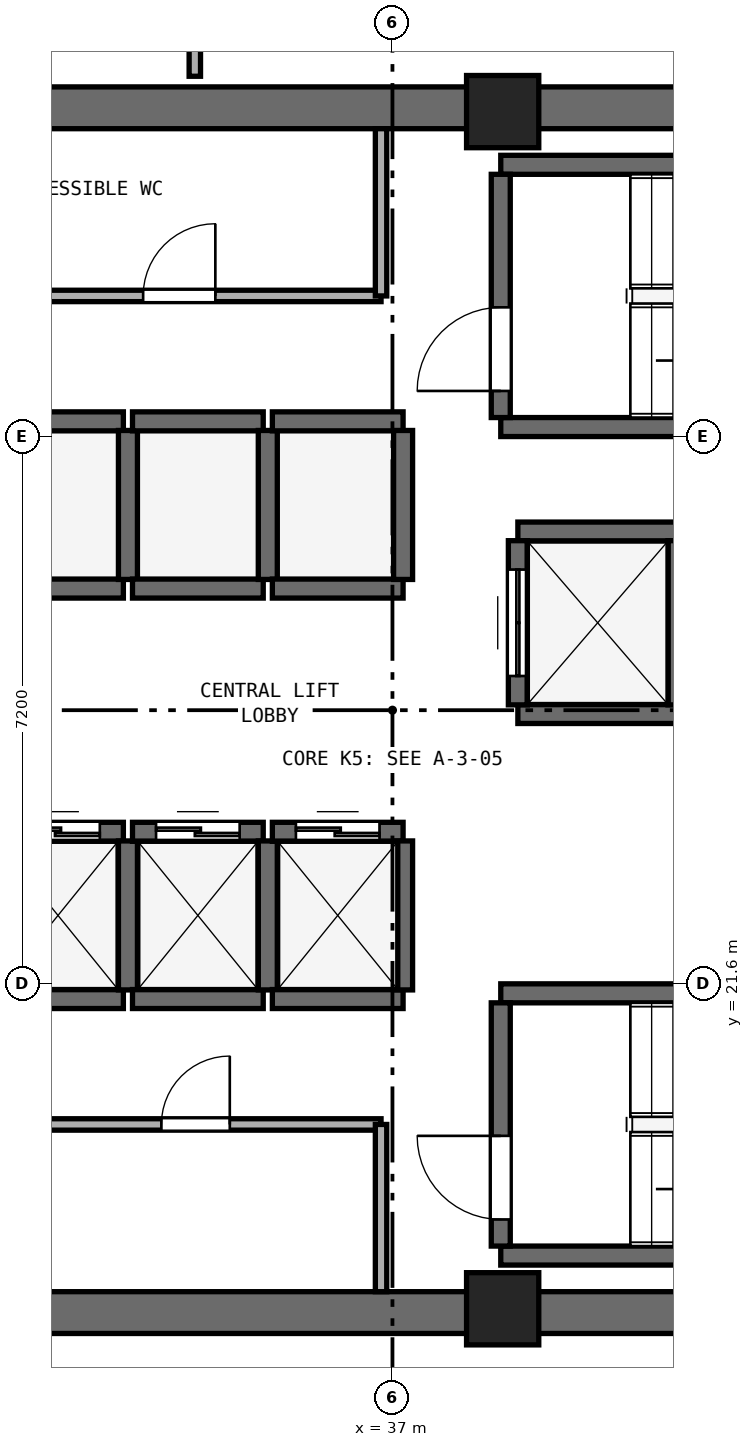
"""IFC4 building model, lengths in metres.
Left out: names, types, materials, properties, quantities, classifications, styles, units other than length and angle.
Written with IfcOpenShell. Run it as: python <this file> out.ifc"""

import sys

from ifc_helpers import new_model, si_unit, direction, frame, frame_2d, origin, origin_2d, place, context, subcontext, project, spatial, rectangle, extrude, element, fill, save


model = new_model("IFC4")
c1 = context("Model", 3, precision=1e-05, world=origin(), true_north=direction((0.0, 1.0)))
c2 = subcontext(c1, "Body", "Model", "MODEL_VIEW")
j1 = project(units=[si_unit("LENGTHUNIT", "METRE"), si_unit("PLANEANGLEUNIT", "RADIAN")], contexts=[c1])
p1 = place(None, origin())
s1 = spatial("IfcSite", under=j1, at=p1, CompositionType="ELEMENT")
p2 = place(p1, origin())
s2 = spatial("IfcBuilding", under=s1, at=p2, CompositionType="ELEMENT")
p3 = place(p2, frame((0.0, 0.0, 212.4)))
s3 = spatial("IfcBuildingStorey", under=s2, at=p3, CompositionType="ELEMENT", Elevation=212.4)
for number, where, z_axis, x_axis in (
    (1, (25.4, 17.275, 0.0), (0.0, 0.0, 1.0), (1.0, 0.0, 0.0)),
    (2, (25.4, 33.125, 0.0), (0.0, 0.0, 1.0), (1.0, 0.0, 0.0)),
):
    element("IfcWall", number, at=place(p3, frame(where, z_axis=z_axis, x_axis=x_axis)), inside=s3, PredefinedType="SHEAR", context=c2, shape_type="SweptSolid", body=[
        extrude(rectangle(XDim=23.2, YDim=0.55, at=frame_2d((11.6, 0.0))), origin(), (0.0, 0.0, 1.0), 3.54),
    ])
for number, where, z_axis, x_axis in (
    (3, (38.45, 17.325, 0.0), (0.0, 0.0, 1.0), (1.0, 0.0, 0.0)),
    (4, (38.45, 33.075, 0.0), (0.0, 0.0, 1.0), (1.0, 0.0, 0.0)),
):
    element("IfcColumn", number, at=place(p3, frame(where, z_axis=z_axis, x_axis=x_axis)), inside=s3, PredefinedType="PILASTER", context=c2, shape_type="SweptSolid", body=[
        extrude(rectangle(XDim=0.95, YDim=0.95, at=origin_2d()), origin(), (0.0, 0.0, 1.0), 3.8),
    ])
for number, where, z_axis, x_axis in (
    (5, (38.425, 28.925, 0.0), (0.0, 0.0, 1.0), (1.0, 0.0, 0.0)),
    (6, (38.425, 32.375, 0.0), (0.0, 0.0, 1.0), (1.0, 0.0, 0.0)),
):
    element("IfcWall", number, at=place(p3, frame(where, z_axis=z_axis, x_axis=x_axis)), inside=s3, PredefinedType="SHEAR", context=c2, shape_type="SweptSolid", body=[
        extrude(rectangle(XDim=7.3, YDim=0.25, at=frame_2d((3.65, 0.0))), origin(), (0.0, 0.0, 1.0), 3.54),
    ])
p4 = place(p3, frame((38.425, 29.05, 0.0), z_axis=(0.0, 0.0, 1.0), x_axis=(0.0, 1.0, 0.0)))
e7 = element("IfcWall", 7, at=p4, inside=s3, PredefinedType="SHEAR", context=c2, shape_type="SweptSolid", body=[
    extrude(rectangle(XDim=3.2, YDim=0.25, at=frame_2d((1.6, 0.0))), origin(), (0.0, 0.0, 1.0), 3.54),
])
p5 = place(p4, frame((0.35, 0.0, 0.0)))
e8 = element("IfcOpeningElement", 8, at=p5, cuts=e7, PredefinedType="OPENING", context=c2, shape_type="SweptSolid", body=[
    extrude(rectangle(XDim=1.1, YDim=2.15, at=frame_2d((0.55, 1.075))), frame((0.0, 0.135, 0.0), z_axis=(0.0, -1.0, 0.0), x_axis=(1.0, 0.0, 0.0)), (0.0, 0.0, 1.0), 0.27),
])
for number, where, z_axis, x_axis in (
    (9, (38.425, 18.025, 0.0), (0.0, 0.0, 1.0), (1.0, 0.0, 0.0)),
    (10, (38.425, 21.475, 0.0), (0.0, 0.0, 1.0), (1.0, 0.0, 0.0)),
):
    element("IfcWall", number, at=place(p3, frame(where, z_axis=z_axis, x_axis=x_axis)), inside=s3, PredefinedType="SHEAR", context=c2, shape_type="SweptSolid", body=[
        extrude(rectangle(XDim=7.3, YDim=0.25, at=frame_2d((3.65, 0.0))), origin(), (0.0, 0.0, 1.0), 3.54),
    ])
p6 = place(p3, frame((38.425, 18.15, 0.0), z_axis=(0.0, 0.0, 1.0), x_axis=(0.0, 1.0, 0.0)))
e11 = element("IfcWall", 11, at=p6, inside=s3, PredefinedType="SHEAR", context=c2, shape_type="SweptSolid", body=[
    extrude(rectangle(XDim=3.2, YDim=0.25, at=frame_2d((1.6, 0.0))), origin(), (0.0, 0.0, 1.0), 3.54),
])
p7 = place(p6, frame((0.35, 0.0, 0.0)))
e12 = element("IfcOpeningElement", 12, at=p7, cuts=e11, PredefinedType="OPENING", context=c2, shape_type="SweptSolid", body=[
    extrude(rectangle(XDim=1.1, YDim=2.15, at=frame_2d((0.55, 1.075))), frame((0.0, 0.135, 0.0), z_axis=(0.0, -1.0, 0.0), x_axis=(1.0, 0.0, 0.0)), (0.0, 0.0, 1.0), 0.27),
])
p8 = place(p3, frame((31.74, 21.4, 0.0), z_axis=(0.0, 0.0, 1.0), x_axis=(1.0, 0.0, 0.0)))
e13 = element("IfcWall", 13, at=p8, inside=s3, PredefinedType="SHEAR", context=c2, shape_type="SweptSolid", body=[
    extrude(rectangle(XDim=1.72, YDim=0.25, at=frame_2d((0.86, 0.0))), origin(), (0.0, 0.0, 1.0), 3.54),
])
p9 = place(p3, frame((31.74, 23.6, 0.0), z_axis=(0.0, 0.0, 1.0), x_axis=(1.0, 0.0, 0.0)))
e14 = element("IfcWall", 14, at=p9, inside=s3, PredefinedType="SHEAR", context=c2, shape_type="SweptSolid", body=[
    extrude(rectangle(XDim=1.72, YDim=0.25, at=frame_2d((0.86, 0.0))), origin(), (0.0, 0.0, 1.0), 3.54),
])
p10 = place(p9, frame((0.31, 0.0, 0.0)))
e15 = element("IfcOpeningElement", 15, at=p10, cuts=e14, PredefinedType="OPENING", context=c2, shape_type="SweptSolid", body=[
    extrude(rectangle(XDim=1.1, YDim=2.15, at=frame_2d((0.55, 1.075))), frame((0.0, 0.135, 0.0), z_axis=(0.0, -1.0, 0.0), x_axis=(1.0, 0.0, 0.0)), (0.0, 0.0, 1.0), 0.27),
])
p11 = place(p3, frame((33.52, 21.52, 0.0), z_axis=(0.0, 0.0, 1.0), x_axis=(0.0, 1.0, 0.0)))
e16 = element("IfcWall", 16, at=p11, inside=s3, PredefinedType="SHEAR", context=c2, shape_type="SweptSolid", body=[
    extrude(rectangle(XDim=1.96, YDim=0.25, at=frame_2d((0.98, 0.0))), origin(), (0.0, 0.0, 1.0), 3.54),
])
p12 = place(p3, frame((33.58, 21.4, 0.0), z_axis=(0.0, 0.0, 1.0), x_axis=(1.0, 0.0, 0.0)))
e17 = element("IfcWall", 17, at=p12, inside=s3, PredefinedType="SHEAR", context=c2, shape_type="SweptSolid", body=[
    extrude(rectangle(XDim=1.72, YDim=0.25, at=frame_2d((0.86, 0.0))), origin(), (0.0, 0.0, 1.0), 3.54),
])
p13 = place(p3, frame((33.58, 23.6, 0.0), z_axis=(0.0, 0.0, 1.0), x_axis=(1.0, 0.0, 0.0)))
e18 = element("IfcWall", 18, at=p13, inside=s3, PredefinedType="SHEAR", context=c2, shape_type="SweptSolid", body=[
    extrude(rectangle(XDim=1.72, YDim=0.25, at=frame_2d((0.86, 0.0))), origin(), (0.0, 0.0, 1.0), 3.54),
])
p14 = place(p13, frame((0.31, 0.0, 0.0)))
e19 = element("IfcOpeningElement", 19, at=p14, cuts=e18, PredefinedType="OPENING", context=c2, shape_type="SweptSolid", body=[
    extrude(rectangle(XDim=1.1, YDim=2.15, at=frame_2d((0.55, 1.075))), frame((0.0, 0.135, 0.0), z_axis=(0.0, -1.0, 0.0), x_axis=(1.0, 0.0, 0.0)), (0.0, 0.0, 1.0), 0.27),
])
p15 = place(p3, frame((35.36, 21.52, 0.0), z_axis=(0.0, 0.0, 1.0), x_axis=(0.0, 1.0, 0.0)))
e20 = element("IfcWall", 20, at=p15, inside=s3, PredefinedType="SHEAR", context=c2, shape_type="SweptSolid", body=[
    extrude(rectangle(XDim=1.96, YDim=0.25, at=frame_2d((0.98, 0.0))), origin(), (0.0, 0.0, 1.0), 3.54),
])
p16 = place(p3, frame((35.42, 21.4, 0.0), z_axis=(0.0, 0.0, 1.0), x_axis=(1.0, 0.0, 0.0)))
e21 = element("IfcWall", 21, at=p16, inside=s3, PredefinedType="SHEAR", context=c2, shape_type="SweptSolid", body=[
    extrude(rectangle(XDim=1.72, YDim=0.25, at=frame_2d((0.86, 0.0))), origin(), (0.0, 0.0, 1.0), 3.54),
])
p17 = place(p3, frame((35.42, 23.6, 0.0), z_axis=(0.0, 0.0, 1.0), x_axis=(1.0, 0.0, 0.0)))
e22 = element("IfcWall", 22, at=p17, inside=s3, PredefinedType="SHEAR", context=c2, shape_type="SweptSolid", body=[
    extrude(rectangle(XDim=1.72, YDim=0.25, at=frame_2d((0.86, 0.0))), origin(), (0.0, 0.0, 1.0), 3.54),
])
p18 = place(p17, frame((0.31, 0.0, 0.0)))
e23 = element("IfcOpeningElement", 23, at=p18, cuts=e22, PredefinedType="OPENING", context=c2, shape_type="SweptSolid", body=[
    extrude(rectangle(XDim=1.1, YDim=2.15, at=frame_2d((0.55, 1.075))), frame((0.0, 0.135, 0.0), z_axis=(0.0, -1.0, 0.0), x_axis=(1.0, 0.0, 0.0)), (0.0, 0.0, 1.0), 0.27),
])
p19 = place(p3, frame((37.14, 21.52, 0.0), z_axis=(0.0, 0.0, 1.0), x_axis=(0.0, 1.0, 0.0)))
e24 = element("IfcWall", 24, at=p19, inside=s3, PredefinedType="SHEAR", context=c2, shape_type="SweptSolid", body=[
    extrude(rectangle(XDim=1.96, YDim=0.25, at=frame_2d((0.98, 0.0))), origin(), (0.0, 0.0, 1.0), 3.54),
])
for number, where, z_axis, x_axis in (
    (25, (31.74, 26.8, 0.0), (0.0, 0.0, 1.0), (1.0, 0.0, 0.0)),
    (26, (31.74, 29.0, 0.0), (0.0, 0.0, 1.0), (1.0, 0.0, 0.0)),
):
    element("IfcWall", number, at=place(p3, frame(where, z_axis=z_axis, x_axis=x_axis)), inside=s3, PredefinedType="SHEAR", context=c2, shape_type="SweptSolid", body=[
        extrude(rectangle(XDim=1.72, YDim=0.25, at=frame_2d((0.86, 0.0))), origin(), (0.0, 0.0, 1.0), 3.54),
    ])
p20 = place(p3, frame((33.52, 26.92, 0.0), z_axis=(0.0, 0.0, 1.0), x_axis=(0.0, 1.0, 0.0)))
e27 = element("IfcWall", 27, at=p20, inside=s3, PredefinedType="SHEAR", context=c2, shape_type="SweptSolid", body=[
    extrude(rectangle(XDim=1.96, YDim=0.25, at=frame_2d((0.98, 0.0))), origin(), (0.0, 0.0, 1.0), 3.54),
])
for number, where, z_axis, x_axis in (
    (28, (33.58, 26.8, 0.0), (0.0, 0.0, 1.0), (1.0, 0.0, 0.0)),
    (29, (33.58, 29.0, 0.0), (0.0, 0.0, 1.0), (1.0, 0.0, 0.0)),
):
    element("IfcWall", number, at=place(p3, frame(where, z_axis=z_axis, x_axis=x_axis)), inside=s3, PredefinedType="SHEAR", context=c2, shape_type="SweptSolid", body=[
        extrude(rectangle(XDim=1.72, YDim=0.25, at=frame_2d((0.86, 0.0))), origin(), (0.0, 0.0, 1.0), 3.54),
    ])
p21 = place(p3, frame((35.36, 26.92, 0.0), z_axis=(0.0, 0.0, 1.0), x_axis=(0.0, 1.0, 0.0)))
e30 = element("IfcWall", 30, at=p21, inside=s3, PredefinedType="SHEAR", context=c2, shape_type="SweptSolid", body=[
    extrude(rectangle(XDim=1.96, YDim=0.25, at=frame_2d((0.98, 0.0))), origin(), (0.0, 0.0, 1.0), 3.54),
])
for number, where, z_axis, x_axis in (
    (31, (35.42, 26.8, 0.0), (0.0, 0.0, 1.0), (1.0, 0.0, 0.0)),
    (32, (35.42, 29.0, 0.0), (0.0, 0.0, 1.0), (1.0, 0.0, 0.0)),
):
    element("IfcWall", number, at=place(p3, frame(where, z_axis=z_axis, x_axis=x_axis)), inside=s3, PredefinedType="SHEAR", context=c2, shape_type="SweptSolid", body=[
        extrude(rectangle(XDim=1.72, YDim=0.25, at=frame_2d((0.86, 0.0))), origin(), (0.0, 0.0, 1.0), 3.54),
    ])
p22 = place(p3, frame((37.14, 26.92, 0.0), z_axis=(0.0, 0.0, 1.0), x_axis=(0.0, 1.0, 0.0)))
e33 = element("IfcWall", 33, at=p22, inside=s3, PredefinedType="SHEAR", context=c2, shape_type="SweptSolid", body=[
    extrude(rectangle(XDim=1.96, YDim=0.25, at=frame_2d((0.98, 0.0))), origin(), (0.0, 0.0, 1.0), 3.54),
])
for number, where, z_axis, x_axis in (
    (34, (38.65, 25.15, 0.0), (0.0, 0.0, 1.0), (1.0, 0.0, 0.0)),
    (35, (38.65, 27.55, 0.0), (0.0, 0.0, 1.0), (1.0, 0.0, 0.0)),
):
    element("IfcWall", number, at=place(p3, frame(where, z_axis=z_axis, x_axis=x_axis)), inside=s3, PredefinedType="SHEAR", context=c2, shape_type="SweptSolid", body=[
        extrude(rectangle(XDim=2.1, YDim=0.25, at=frame_2d((1.05, 0.0))), origin(), (0.0, 0.0, 1.0), 3.54),
    ])
p23 = place(p3, frame((38.65, 25.27, 0.0), z_axis=(0.0, 0.0, 1.0), x_axis=(0.0, 1.0, 0.0)))
e36 = element("IfcWall", 36, at=p23, inside=s3, PredefinedType="SHEAR", context=c2, shape_type="SweptSolid", body=[
    extrude(rectangle(XDim=2.16, YDim=0.25, at=frame_2d((1.08, 0.0))), origin(), (0.0, 0.0, 1.0), 3.54),
])
p24 = place(p23, frame((0.38, 0.0, 0.0)))
e37 = element("IfcOpeningElement", 37, at=p24, cuts=e36, PredefinedType="OPENING", context=c2, shape_type="SweptSolid", body=[
    extrude(rectangle(XDim=1.4, YDim=2.2, at=frame_2d((0.7, 1.1))), frame((0.0, 0.135, 0.0), z_axis=(0.0, -1.0, 0.0), x_axis=(1.0, 0.0, 0.0)), (0.0, 0.0, 1.0), 0.27),
])
p25 = place(p3, frame((40.75, 25.27, 0.0), z_axis=(0.0, 0.0, 1.0), x_axis=(0.0, 1.0, 0.0)))
e38 = element("IfcWall", 38, at=p25, inside=s3, PredefinedType="SHEAR", context=c2, shape_type="SweptSolid", body=[
    extrude(rectangle(XDim=2.16, YDim=0.25, at=frame_2d((1.08, 0.0))), origin(), (0.0, 0.0, 1.0), 3.54),
])
p26 = place(p3, frame((31.54, 30.65, 0.0), z_axis=(0.0, 0.0, 1.0), x_axis=(1.0, 0.0, 0.0)))
e39 = element("IfcWall", 39, at=p26, inside=s3, PredefinedType="PARTITIONING", context=c2, shape_type="SweptSolid", body=[
    extrude(rectangle(XDim=5.31, YDim=0.15, at=frame_2d((2.655, 0.0))), origin(), (0.0, 0.0, 1.0), 3.54),
])
p27 = place(p26, frame((2.18, 0.0, 0.0)))
e40 = element("IfcOpeningElement", 40, at=p27, cuts=e39, PredefinedType="OPENING", context=c2, shape_type="SweptSolid", body=[
    extrude(rectangle(XDim=0.95, YDim=2.1, at=frame_2d((0.475, 1.05))), frame((0.0, 0.085, 0.0), z_axis=(0.0, -1.0, 0.0), x_axis=(1.0, 0.0, 0.0)), (0.0, 0.0, 1.0), 0.17),
])
p28 = place(p3, frame((36.85, 30.65, 0.0), z_axis=(0.0, 0.0, 1.0), x_axis=(0.0, 1.0, 0.0)))
e41 = element("IfcWall", 41, at=p28, inside=s3, PredefinedType="PARTITIONING", context=c2, shape_type="SweptSolid", body=[
    extrude(rectangle(XDim=2.2, YDim=0.15, at=frame_2d((1.1, 0.0))), origin(), (0.0, 0.0, 1.0), 3.54),
])
p29 = place(p3, frame((31.97, 19.75, 0.0), z_axis=(0.0, 0.0, 1.0), x_axis=(1.0, 0.0, 0.0)))
e42 = element("IfcWall", 42, at=p29, inside=s3, PredefinedType="PARTITIONING", context=c2, shape_type="SweptSolid", body=[
    extrude(rectangle(XDim=4.88, YDim=0.15, at=frame_2d((2.44, 0.0))), origin(), (0.0, 0.0, 1.0), 3.54),
])
p30 = place(p29, frame((1.99, 0.0, 0.0)))
e43 = element("IfcOpeningElement", 43, at=p30, cuts=e42, PredefinedType="OPENING", context=c2, shape_type="SweptSolid", body=[
    extrude(rectangle(XDim=0.9, YDim=2.1, at=frame_2d((0.45, 1.05))), frame((0.0, 0.085, 0.0), z_axis=(0.0, -1.0, 0.0), x_axis=(1.0, 0.0, 0.0)), (0.0, 0.0, 1.0), 0.17),
])
p31 = place(p3, frame((36.85, 17.55, 0.0), z_axis=(0.0, 0.0, 1.0), x_axis=(0.0, 1.0, 0.0)))
e44 = element("IfcWall", 44, at=p31, inside=s3, PredefinedType="PARTITIONING", context=c2, shape_type="SweptSolid", body=[
    extrude(rectangle(XDim=2.2, YDim=0.15, at=frame_2d((1.1, 0.0))), origin(), (0.0, 0.0, 1.0), 3.54),
])
p32 = place(p3, frame((34.4, 33.54, 0.0), z_axis=(0.0, 0.0, 1.0), x_axis=(0.0, 1.0, 0.0)))
e45 = element("IfcWall", 45, at=p32, inside=s3, PredefinedType="PARTITIONING", context=c2, shape_type="SweptSolid", body=[
    extrude(rectangle(XDim=2.76, YDim=0.15, at=frame_2d((1.38, 0.0))), origin(), (0.0, 0.0, 1.0), 3.54),
])
p33 = place(p5, origin())
e46 = element("IfcDoor", 46, at=p33, inside=s3, OperationType="SINGLE_SWING_LEFT", PredefinedType="DOOR", context=c2, shape_type="SweptSolid", body=[
    extrude(rectangle(XDim=1.1, YDim=2.15, at=frame_2d((0.55, 1.075))), frame((0.0, 0.025, 0.0), z_axis=(0.0, -1.0, 0.0), x_axis=(1.0, 0.0, 0.0)), (0.0, 0.0, 1.0), 0.05),
])
fill(e8, e46)
p34 = place(p7, origin())
e47 = element("IfcDoor", 47, at=p34, inside=s3, OperationType="SINGLE_SWING_RIGHT", PredefinedType="DOOR", context=c2, shape_type="SweptSolid", body=[
    extrude(rectangle(XDim=1.1, YDim=2.15, at=frame_2d((0.55, 1.075))), frame((0.0, 0.025, 0.0), z_axis=(0.0, -1.0, 0.0), x_axis=(1.0, 0.0, 0.0)), (0.0, 0.0, 1.0), 0.05),
])
fill(e12, e47)
p35 = place(p10, origin())
e48 = element("IfcDoor", 48, at=p35, inside=s3, OperationType="DOUBLE_DOOR_SLIDING", PredefinedType="DOOR", context=c2, shape_type="SweptSolid", body=[
    extrude(rectangle(XDim=1.1, YDim=2.15, at=frame_2d((0.55, 1.075))), frame((0.0, 0.025, 0.0), z_axis=(0.0, -1.0, 0.0), x_axis=(1.0, 0.0, 0.0)), (0.0, 0.0, 1.0), 0.05),
])
fill(e15, e48)
p36 = place(p14, origin())
e49 = element("IfcDoor", 49, at=p36, inside=s3, OperationType="DOUBLE_DOOR_SLIDING", PredefinedType="DOOR", context=c2, shape_type="SweptSolid", body=[
    extrude(rectangle(XDim=1.1, YDim=2.15, at=frame_2d((0.55, 1.075))), frame((0.0, 0.025, 0.0), z_axis=(0.0, -1.0, 0.0), x_axis=(1.0, 0.0, 0.0)), (0.0, 0.0, 1.0), 0.05),
])
fill(e19, e49)
p37 = place(p18, origin())
e50 = element("IfcDoor", 50, at=p37, inside=s3, OperationType="DOUBLE_DOOR_SLIDING", PredefinedType="DOOR", context=c2, shape_type="SweptSolid", body=[
    extrude(rectangle(XDim=1.1, YDim=2.15, at=frame_2d((0.55, 1.075))), frame((0.0, 0.025, 0.0), z_axis=(0.0, -1.0, 0.0), x_axis=(1.0, 0.0, 0.0)), (0.0, 0.0, 1.0), 0.05),
])
fill(e23, e50)
p38 = place(p24, origin())
e51 = element("IfcDoor", 51, at=p38, inside=s3, OperationType="DOUBLE_DOOR_SLIDING", PredefinedType="DOOR", context=c2, shape_type="SweptSolid", body=[
    extrude(rectangle(XDim=1.4, YDim=2.2, at=frame_2d((0.7, 1.1))), frame((0.0, 0.025, 0.0), z_axis=(0.0, -1.0, 0.0), x_axis=(1.0, 0.0, 0.0)), (0.0, 0.0, 1.0), 0.05),
])
fill(e37, e51)
p39 = place(p27, origin())
e52 = element("IfcDoor", 52, at=p39, inside=s3, OperationType="SINGLE_SWING_RIGHT", PredefinedType="DOOR", context=c2, shape_type="SweptSolid", body=[
    extrude(rectangle(XDim=0.95, YDim=2.1, at=frame_2d((0.475, 1.05))), frame((0.0, 0.025, 0.0), z_axis=(0.0, -1.0, 0.0), x_axis=(1.0, 0.0, 0.0)), (0.0, 0.0, 1.0), 0.05),
])
fill(e40, e52)
p40 = place(p30, origin())
e53 = element("IfcDoor", 53, at=p40, inside=s3, OperationType="SINGLE_SWING_RIGHT", PredefinedType="DOOR", context=c2, shape_type="SweptSolid", body=[
    extrude(rectangle(XDim=0.9, YDim=2.1, at=frame_2d((0.45, 1.05))), frame((0.0, 0.025, 0.0), z_axis=(0.0, -1.0, 0.0), x_axis=(1.0, 0.0, 0.0)), (0.0, 0.0, 1.0), 0.05),
])
fill(e43, e53)
save(model, sys.argv[1])
